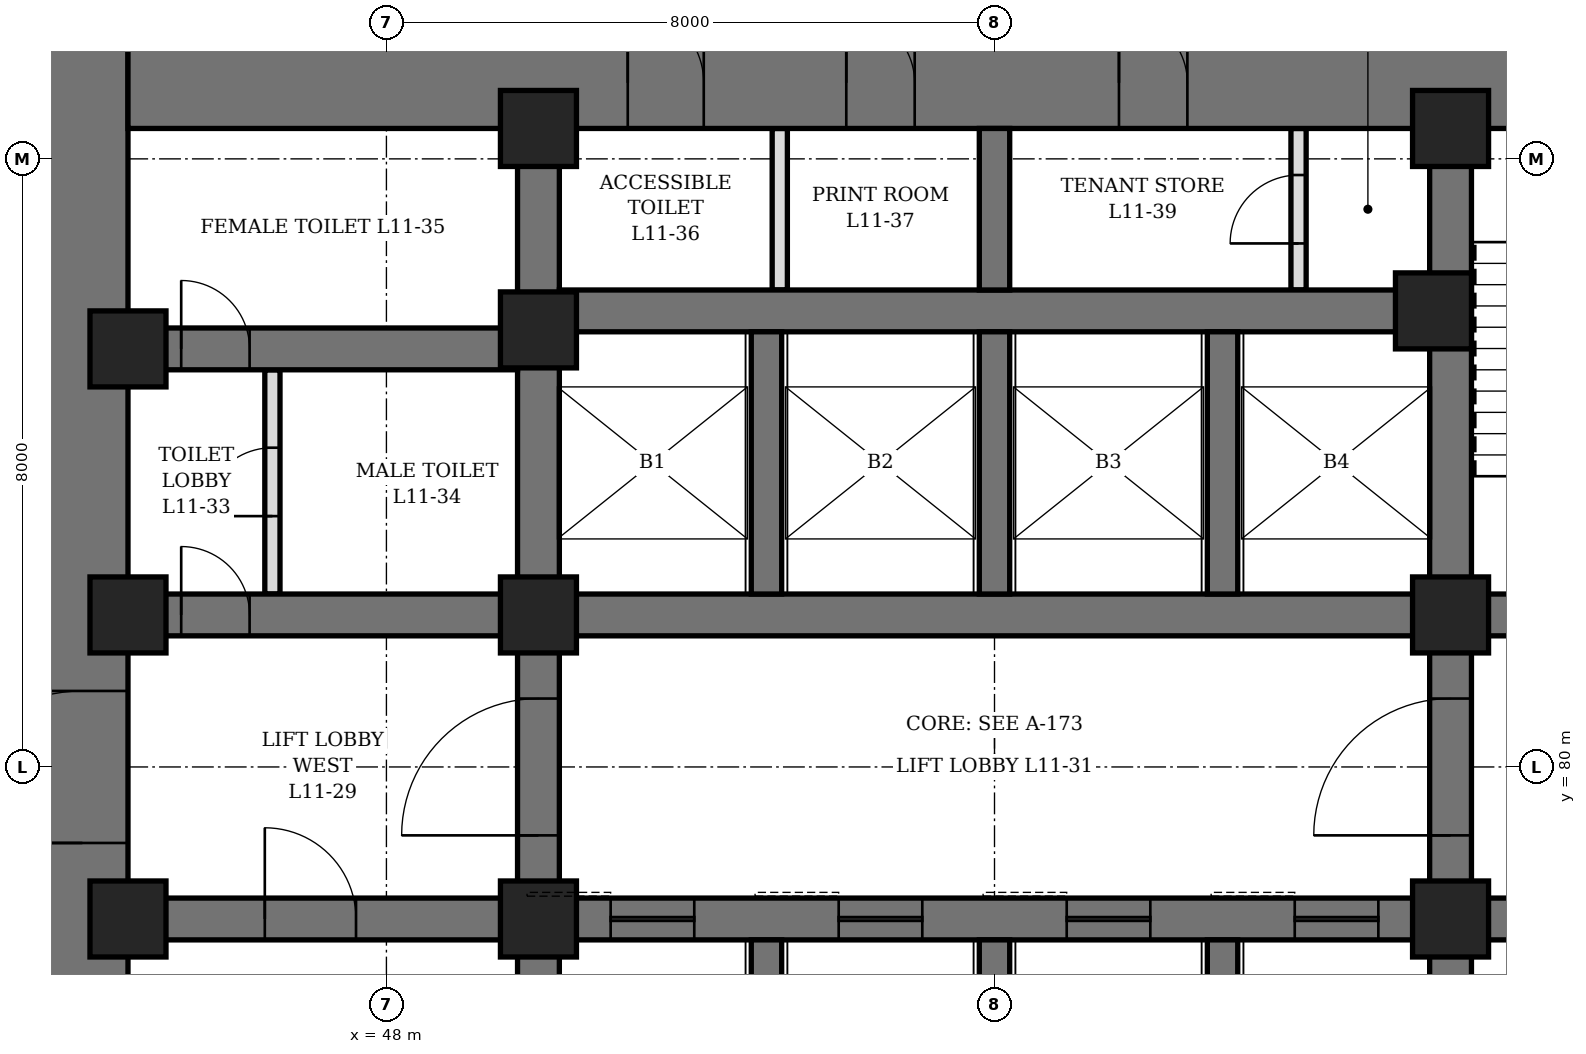
"""IFC4 building model, lengths in metres.
Left out: names, types, materials, properties, quantities, classifications, styles, units other than length and angle.
Written with IfcOpenShell. Run it as: python <this file> out.ifc"""

import sys

from ifc_helpers import new_model, si_unit, direction, frame, frame_2d, origin, origin_2d, place, context, subcontext, project, spatial, rectangle, hollow_rectangle, extrude, element, fill, save


model = new_model("IFC4")
c1 = context("Model", 3, precision=1e-05, world=origin(), true_north=direction((0.0, 1.0)))
c2 = subcontext(c1, "Body", "Model", "MODEL_VIEW")
j1 = project(units=[si_unit("LENGTHUNIT", "METRE"), si_unit("PLANEANGLEUNIT", "RADIAN")], contexts=[c1])
p1 = place(None, origin())
s1 = spatial("IfcSite", under=j1, at=p1, CompositionType="ELEMENT")
p2 = place(p1, origin())
s2 = spatial("IfcBuilding", under=s1, at=p2, CompositionType="ELEMENT")
p3 = place(p2, frame((0.0, 0.0, 55.9)))
s3 = spatial("IfcBuildingStorey", under=s2, at=p3, CompositionType="ELEMENT", Elevation=55.9)
p4 = place(p3, frame((44.0, 70.4, 0.0), z_axis=(0.0, 0.0, 1.0), x_axis=(0.0, 1.0, 0.0)))
e1 = element("IfcWall", 1, at=p4, inside=s3, PredefinedType="SHEAR", context=c2, shape_type="SweptSolid", body=[
    extrude(rectangle(XDim=19.2, YDim=1.2, at=frame_2d((9.6, 0.0))), origin(), (0.0, 0.0, 1.0), 4.2),
])
p5 = place(p4, frame((8.6, 0.0, 0.0)))
e2 = element("IfcOpeningElement", 2, at=p5, cuts=e1, PredefinedType="OPENING", context=c2, shape_type="SweptSolid", body=[
    extrude(rectangle(XDim=2.0, YDim=2.4, at=frame_2d((1.0, 1.2))), frame((0.0, 0.61, 0.0), z_axis=(0.0, -1.0, 0.0), x_axis=(1.0, 0.0, 0.0)), (0.0, 0.0, 1.0), 1.22),
])
p6 = place(p3, frame((44.6, 89.0, 0.0), z_axis=(0.0, 0.0, 1.0), x_axis=(1.0, 0.0, 0.0)))
e3 = element("IfcWall", 3, at=p6, inside=s3, PredefinedType="SHEAR", context=c2, shape_type="SweptSolid", body=[
    extrude(rectangle(XDim=22.8, YDim=1.2, at=frame_2d((11.4, 0.0))), origin(), (0.0, 0.0, 1.0), 4.2),
])
p7 = place(p6, frame((6.575, 0.0, 0.0)))
e4 = element("IfcOpeningElement", 4, at=p7, cuts=e3, PredefinedType="OPENING", context=c2, shape_type="SweptSolid", body=[
    extrude(rectangle(XDim=1.0, YDim=2.1, at=frame_2d((0.5, 1.05))), frame((0.0, 0.61, 0.0), z_axis=(0.0, -1.0, 0.0), x_axis=(1.0, 0.0, 0.0)), (0.0, 0.0, 1.0), 1.22),
])
p8 = place(p6, frame((9.45, 0.0, 0.0)))
e5 = element("IfcOpeningElement", 5, at=p8, cuts=e3, PredefinedType="OPENING", context=c2, shape_type="SweptSolid", body=[
    extrude(rectangle(XDim=0.9, YDim=2.1, at=frame_2d((0.45, 1.05))), frame((0.0, 0.61, 0.0), z_axis=(0.0, -1.0, 0.0), x_axis=(1.0, 0.0, 0.0)), (0.0, 0.0, 1.0), 1.22),
])
p9 = place(p6, frame((13.038, 0.0, 0.0)))
e6 = element("IfcOpeningElement", 6, at=p9, cuts=e3, PredefinedType="OPENING", context=c2, shape_type="SweptSolid", body=[
    extrude(rectangle(XDim=0.9, YDim=2.1, at=frame_2d((0.45, 1.05))), frame((0.0, 0.61, 0.0), z_axis=(0.0, -1.0, 0.0), x_axis=(1.0, 0.0, 0.0)), (0.0, 0.0, 1.0), 1.22),
])
p10 = place(p3, frame((50.0, 71.6, 0.0), z_axis=(0.0, 0.0, 1.0), x_axis=(0.0, 1.0, 0.0)))
e7 = element("IfcWall", 7, at=p10, inside=s3, PredefinedType="SHEAR", context=c2, shape_type="SweptSolid", body=[
    extrude(rectangle(XDim=16.8, YDim=0.55, at=frame_2d((8.4, 0.0))), origin(), (0.0, 0.0, 1.0), 4.2),
])
p11 = place(p10, frame((7.5, 0.0, 0.0)))
e8 = element("IfcOpeningElement", 8, at=p11, cuts=e7, PredefinedType="OPENING", context=c2, shape_type="SweptSolid", body=[
    extrude(rectangle(XDim=1.8, YDim=2.4, at=frame_2d((0.9, 1.2))), frame((0.0, 0.285, 0.0), z_axis=(0.0, -1.0, 0.0), x_axis=(1.0, 0.0, 0.0)), (0.0, 0.0, 1.0), 0.57),
])
p12 = place(p3, frame((62.0, 71.6, 0.0), z_axis=(0.0, 0.0, 1.0), x_axis=(0.0, 1.0, 0.0)))
e9 = element("IfcWall", 9, at=p12, inside=s3, PredefinedType="SHEAR", context=c2, shape_type="SweptSolid", body=[
    extrude(rectangle(XDim=16.8, YDim=0.55, at=frame_2d((8.4, 0.0))), origin(), (0.0, 0.0, 1.0), 4.2),
])
p13 = place(p12, frame((7.5, 0.0, 0.0)))
e10 = element("IfcOpeningElement", 10, at=p13, cuts=e9, PredefinedType="OPENING", context=c2, shape_type="SweptSolid", body=[
    extrude(rectangle(XDim=1.8, YDim=2.4, at=frame_2d((0.9, 1.2))), frame((0.0, 0.285, 0.0), z_axis=(0.0, -1.0, 0.0), x_axis=(1.0, 0.0, 0.0)), (0.0, 0.0, 1.0), 0.57),
])
p14 = place(p3, frame((44.6, 78.0, 0.0), z_axis=(0.0, 0.0, 1.0), x_axis=(1.0, 0.0, 0.0)))
e11 = element("IfcWall", 11, at=p14, inside=s3, PredefinedType="SHEAR", context=c2, shape_type="SweptSolid", body=[
    extrude(rectangle(XDim=5.125, YDim=0.55, at=frame_2d((2.562, 0.0))), origin(), (0.0, 0.0, 1.0), 4.2),
])
p15 = place(p14, frame((1.8, 0.0, 0.0)))
e12 = element("IfcOpeningElement", 12, at=p15, cuts=e11, PredefinedType="OPENING", context=c2, shape_type="SweptSolid", body=[
    extrude(rectangle(XDim=1.2, YDim=2.1, at=frame_2d((0.6, 1.05))), frame((0.0, 0.285, 0.0), z_axis=(0.0, -1.0, 0.0), x_axis=(1.0, 0.0, 0.0)), (0.0, 0.0, 1.0), 0.57),
])
p16 = place(p3, frame((44.6, 82.0, 0.0), z_axis=(0.0, 0.0, 1.0), x_axis=(1.0, 0.0, 0.0)))
e13 = element("IfcWall", 13, at=p16, inside=s3, PredefinedType="SHEAR", context=c2, shape_type="SweptSolid", body=[
    extrude(rectangle(XDim=5.125, YDim=0.55, at=frame_2d((2.562, 0.0))), origin(), (0.0, 0.0, 1.0), 4.2),
])
p17 = place(p16, frame((0.7, 0.0, 0.0)))
e14 = element("IfcOpeningElement", 14, at=p17, cuts=e13, PredefinedType="OPENING", context=c2, shape_type="SweptSolid", body=[
    extrude(rectangle(XDim=0.9, YDim=2.1, at=frame_2d((0.45, 1.05))), frame((0.0, 0.285, 0.0), z_axis=(0.0, -1.0, 0.0), x_axis=(1.0, 0.0, 0.0)), (0.0, 0.0, 1.0), 0.57),
])
p18 = place(p3, frame((44.6, 85.5, 0.0), z_axis=(0.0, 0.0, 1.0), x_axis=(1.0, 0.0, 0.0)))
e15 = element("IfcWall", 15, at=p18, inside=s3, PredefinedType="SHEAR", context=c2, shape_type="SweptSolid", body=[
    extrude(rectangle(XDim=5.125, YDim=0.55, at=frame_2d((2.562, 0.0))), origin(), (0.0, 0.0, 1.0), 4.2),
])
p19 = place(p18, frame((0.7, 0.0, 0.0)))
e16 = element("IfcOpeningElement", 16, at=p19, cuts=e15, PredefinedType="OPENING", context=c2, shape_type="SweptSolid", body=[
    extrude(rectangle(XDim=0.9, YDim=2.1, at=frame_2d((0.45, 1.05))), frame((0.0, 0.285, 0.0), z_axis=(0.0, -1.0, 0.0), x_axis=(1.0, 0.0, 0.0)), (0.0, 0.0, 1.0), 0.57),
])
p20 = place(p3, frame((62.275, 78.0, 0.0), z_axis=(0.0, 0.0, 1.0), x_axis=(1.0, 0.0, 0.0)))
e17 = element("IfcWall", 17, at=p20, inside=s3, PredefinedType="SHEAR", context=c2, shape_type="SweptSolid", body=[
    extrude(rectangle(XDim=5.125, YDim=0.55, at=frame_2d((2.562, 0.0))), origin(), (0.0, 0.0, 1.0), 4.2),
])
p21 = place(p20, frame((2.125, 0.0, 0.0)))
e18 = element("IfcOpeningElement", 18, at=p21, cuts=e17, PredefinedType="OPENING", context=c2, shape_type="SweptSolid", body=[
    extrude(rectangle(XDim=1.2, YDim=2.1, at=frame_2d((0.6, 1.05))), frame((0.0, 0.285, 0.0), z_axis=(0.0, -1.0, 0.0), x_axis=(1.0, 0.0, 0.0)), (0.0, 0.0, 1.0), 0.57),
])
p22 = place(p3, frame((62.275, 82.0, 0.0), z_axis=(0.0, 0.0, 1.0), x_axis=(1.0, 0.0, 0.0)))
e19 = element("IfcWall", 19, at=p22, inside=s3, PredefinedType="SHEAR", context=c2, shape_type="SweptSolid", body=[
    extrude(rectangle(XDim=5.125, YDim=0.55, at=frame_2d((2.562, 0.0))), origin(), (0.0, 0.0, 1.0), 4.2),
])
p23 = place(p22, frame((2.125, 0.0, 0.0)))
e20 = element("IfcOpeningElement", 20, at=p23, cuts=e19, PredefinedType="OPENING", context=c2, shape_type="SweptSolid", body=[
    extrude(rectangle(XDim=1.2, YDim=2.1, at=frame_2d((0.6, 1.05))), frame((0.0, 0.285, 0.0), z_axis=(0.0, -1.0, 0.0), x_axis=(1.0, 0.0, 0.0)), (0.0, 0.0, 1.0), 0.57),
])
p24 = place(p3, frame((50.275, 78.0, 0.0), z_axis=(0.0, 0.0, 1.0), x_axis=(1.0, 0.0, 0.0)))
e21 = element("IfcWall", 21, at=p24, inside=s3, PredefinedType="SHEAR", context=c2, shape_type="SweptSolid", body=[
    extrude(rectangle(XDim=11.45, YDim=0.55, at=frame_2d((5.725, 0.0))), origin(), (0.0, 0.0, 1.0), 4.2),
])
p25 = place(p24, frame((0.675, 0.0, 0.0)))
e22 = element("IfcOpeningElement", 22, at=p25, cuts=e21, PredefinedType="OPENING", context=c2, shape_type="SweptSolid", body=[
    extrude(rectangle(XDim=1.1, YDim=2.2, at=frame_2d((0.55, 1.1))), frame((0.0, 0.285, 0.0), z_axis=(0.0, -1.0, 0.0), x_axis=(1.0, 0.0, 0.0)), (0.0, 0.0, 1.0), 0.57),
])
p26 = place(p24, frame((3.675, 0.0, 0.0)))
e23 = element("IfcOpeningElement", 23, at=p26, cuts=e21, PredefinedType="OPENING", context=c2, shape_type="SweptSolid", body=[
    extrude(rectangle(XDim=1.1, YDim=2.2, at=frame_2d((0.55, 1.1))), frame((0.0, 0.285, 0.0), z_axis=(0.0, -1.0, 0.0), x_axis=(1.0, 0.0, 0.0)), (0.0, 0.0, 1.0), 0.57),
])
p27 = place(p24, frame((6.675, 0.0, 0.0)))
e24 = element("IfcOpeningElement", 24, at=p27, cuts=e21, PredefinedType="OPENING", context=c2, shape_type="SweptSolid", body=[
    extrude(rectangle(XDim=1.1, YDim=2.2, at=frame_2d((0.55, 1.1))), frame((0.0, 0.285, 0.0), z_axis=(0.0, -1.0, 0.0), x_axis=(1.0, 0.0, 0.0)), (0.0, 0.0, 1.0), 0.57),
])
p28 = place(p24, frame((9.675, 0.0, 0.0)))
e25 = element("IfcOpeningElement", 25, at=p28, cuts=e21, PredefinedType="OPENING", context=c2, shape_type="SweptSolid", body=[
    extrude(rectangle(XDim=1.1, YDim=2.2, at=frame_2d((0.55, 1.1))), frame((0.0, 0.285, 0.0), z_axis=(0.0, -1.0, 0.0), x_axis=(1.0, 0.0, 0.0)), (0.0, 0.0, 1.0), 0.57),
])
for number, where, z_axis, x_axis in (
    (26, (50.275, 82.0, 0.0), (0.0, 0.0, 1.0), (1.0, 0.0, 0.0)),
    (27, (50.275, 86.0, 0.0), (0.0, 0.0, 1.0), (1.0, 0.0, 0.0)),
):
    element("IfcWall", number, at=place(p3, frame(where, z_axis=z_axis, x_axis=x_axis)), inside=s3, PredefinedType="SHEAR", context=c2, shape_type="SweptSolid", body=[
        extrude(rectangle(XDim=11.45, YDim=0.55, at=frame_2d((5.725, 0.0))), origin(), (0.0, 0.0, 1.0), 4.2),
    ])
p29 = place(p3, frame((53.0, 74.2, 0.0), z_axis=(0.0, 0.0, 1.0), x_axis=(0.0, 1.0, 0.0)))
e28 = element("IfcWall", 28, at=p29, inside=s3, PredefinedType="SHEAR", context=c2, shape_type="SweptSolid", body=[
    extrude(rectangle(XDim=3.525, YDim=0.4, at=frame_2d((1.763, 0.0))), origin(), (0.0, 0.0, 1.0), 4.2),
])
p30 = place(p3, frame((53.0, 82.275, 0.0), z_axis=(0.0, 0.0, 1.0), x_axis=(0.0, 1.0, 0.0)))
e29 = element("IfcWall", 29, at=p30, inside=s3, PredefinedType="SHEAR", context=c2, shape_type="SweptSolid", body=[
    extrude(rectangle(XDim=3.45, YDim=0.4, at=frame_2d((1.725, 0.0))), origin(), (0.0, 0.0, 1.0), 4.2),
])
p31 = place(p3, frame((56.0, 74.2, 0.0), z_axis=(0.0, 0.0, 1.0), x_axis=(0.0, 1.0, 0.0)))
e30 = element("IfcWall", 30, at=p31, inside=s3, PredefinedType="SHEAR", context=c2, shape_type="SweptSolid", body=[
    extrude(rectangle(XDim=3.525, YDim=0.4, at=frame_2d((1.763, 0.0))), origin(), (0.0, 0.0, 1.0), 4.2),
])
p32 = place(p3, frame((56.0, 82.275, 0.0), z_axis=(0.0, 0.0, 1.0), x_axis=(0.0, 1.0, 0.0)))
e31 = element("IfcWall", 31, at=p32, inside=s3, PredefinedType="SHEAR", context=c2, shape_type="SweptSolid", body=[
    extrude(rectangle(XDim=3.45, YDim=0.4, at=frame_2d((1.725, 0.0))), origin(), (0.0, 0.0, 1.0), 4.2),
])
p33 = place(p3, frame((59.0, 74.2, 0.0), z_axis=(0.0, 0.0, 1.0), x_axis=(0.0, 1.0, 0.0)))
e32 = element("IfcWall", 32, at=p33, inside=s3, PredefinedType="SHEAR", context=c2, shape_type="SweptSolid", body=[
    extrude(rectangle(XDim=3.525, YDim=0.4, at=frame_2d((1.763, 0.0))), origin(), (0.0, 0.0, 1.0), 4.2),
])
p34 = place(p3, frame((59.0, 82.275, 0.0), z_axis=(0.0, 0.0, 1.0), x_axis=(0.0, 1.0, 0.0)))
e33 = element("IfcWall", 33, at=p34, inside=s3, PredefinedType="SHEAR", context=c2, shape_type="SweptSolid", body=[
    extrude(rectangle(XDim=3.45, YDim=0.4, at=frame_2d((1.725, 0.0))), origin(), (0.0, 0.0, 1.0), 4.2),
])
p35 = place(p3, frame((56.0, 86.275, 0.0), z_axis=(0.0, 0.0, 1.0), x_axis=(0.0, 1.0, 0.0)))
e34 = element("IfcWall", 34, at=p35, inside=s3, PredefinedType="SHEAR", context=c2, shape_type="SweptSolid", body=[
    extrude(rectangle(XDim=2.125, YDim=0.4, at=frame_2d((1.062, 0.0))), origin(), (0.0, 0.0, 1.0), 4.2),
])
for number, where, z_axis, x_axis in (
    (35, (44.6, 78.0, 0.0), (0.0, 0.0, 1.0), (1.0, 0.0, 0.0)),
    (36, (44.6, 82.0, 0.0), (0.0, 0.0, 1.0), (1.0, 0.0, 0.0)),
    (37, (44.6, 85.5, 0.0), (0.0, 0.0, 1.0), (1.0, 0.0, 0.0)),
    (38, (50.0, 78.0, 0.0), (0.0, 0.0, 1.0), (1.0, 0.0, 0.0)),
    (39, (50.0, 82.0, 0.0), (0.0, 0.0, 1.0), (1.0, 0.0, 0.0)),
    (40, (50.0, 85.75, 0.0), (0.0, 0.0, 1.0), (1.0, 0.0, 0.0)),
    (41, (50.0, 88.4, 0.0), (0.0, 0.0, 1.0), (1.0, 0.0, 0.0)),
    (42, (61.775, 86.0, 0.0), (0.0, 0.0, 1.0), (1.0, 0.0, 0.0)),
    (43, (62.0, 78.0, 0.0), (0.0, 0.0, 1.0), (1.0, 0.0, 0.0)),
    (44, (62.0, 82.0, 0.0), (0.0, 0.0, 1.0), (1.0, 0.0, 0.0)),
    (45, (62.0, 88.4, 0.0), (0.0, 0.0, 1.0), (1.0, 0.0, 0.0)),
):
    element("IfcColumn", number, at=place(p3, frame(where, z_axis=z_axis, x_axis=x_axis)), inside=s3, PredefinedType="COLUMN", context=c2, shape_type="SweptSolid", body=[
        extrude(hollow_rectangle(XDim=1.0, YDim=1.0, WallThickness=0.15, at=origin_2d()), origin(), (0.0, 0.0, 1.0), 4.2),
    ])
p36 = place(p3, frame((46.5, 82.275, 0.0), z_axis=(0.0, 0.0, 1.0), x_axis=(0.0, 1.0, 0.0)))
e46 = element("IfcWall", 46, at=p36, inside=s3, PredefinedType="PARTITIONING", context=c2, shape_type="SweptSolid", body=[
    extrude(rectangle(XDim=2.95, YDim=0.2, at=frame_2d((1.475, 0.0))), origin(), (0.0, 0.0, 1.0), 4.04),
])
p37 = place(p36, frame((1.025, 0.0, 0.0)))
e47 = element("IfcOpeningElement", 47, at=p37, cuts=e46, PredefinedType="OPENING", context=c2, shape_type="SweptSolid", body=[
    extrude(rectangle(XDim=0.9, YDim=2.1, at=frame_2d((0.45, 1.05))), frame((0.0, 0.11, 0.0), z_axis=(0.0, -1.0, 0.0), x_axis=(1.0, 0.0, 0.0)), (0.0, 0.0, 1.0), 0.22),
])
p38 = place(p3, frame((53.175, 86.275, 0.0), z_axis=(0.0, 0.0, 1.0), x_axis=(0.0, 1.0, 0.0)))
e48 = element("IfcWall", 48, at=p38, inside=s3, PredefinedType="PARTITIONING", context=c2, shape_type="SweptSolid", body=[
    extrude(rectangle(XDim=2.125, YDim=0.2, at=frame_2d((1.062, 0.0))), origin(), (0.0, 0.0, 1.0), 4.04),
])
p39 = place(p3, frame((60.0, 86.275, 0.0), z_axis=(0.0, 0.0, 1.0), x_axis=(0.0, 1.0, 0.0)))
e49 = element("IfcWall", 49, at=p39, inside=s3, PredefinedType="PARTITIONING", context=c2, shape_type="SweptSolid", body=[
    extrude(rectangle(XDim=2.125, YDim=0.2, at=frame_2d((1.062, 0.0))), origin(), (0.0, 0.0, 1.0), 4.04),
])
p40 = place(p39, frame((0.613, 0.0, 0.0)))
e50 = element("IfcOpeningElement", 50, at=p40, cuts=e49, PredefinedType="OPENING", context=c2, shape_type="SweptSolid", body=[
    extrude(rectangle(XDim=0.9, YDim=2.1, at=frame_2d((0.45, 1.05))), frame((0.0, 0.11, 0.0), z_axis=(0.0, -1.0, 0.0), x_axis=(1.0, 0.0, 0.0)), (0.0, 0.0, 1.0), 0.22),
])
p41 = place(p17, origin())
e51 = element("IfcDoor", 51, at=p41, inside=s3, OperationType="SINGLE_SWING_LEFT", PredefinedType="DOOR", context=c2, shape_type="SweptSolid", body=[
    extrude(rectangle(XDim=0.9, YDim=2.1, at=frame_2d((0.45, 1.05))), frame((0.0, 0.275, 0.0), z_axis=(0.0, -1.0, 0.0), x_axis=(1.0, 0.0, 0.0)), (0.0, 0.0, 1.0), 0.55),
])
fill(e14, e51)
p42 = place(p37, origin())
e52 = element("IfcDoor", 52, at=p42, inside=s3, OperationType="SINGLE_SWING_RIGHT", PredefinedType="DOOR", context=c2, shape_type="SweptSolid", body=[
    extrude(rectangle(XDim=0.9, YDim=2.1, at=frame_2d((0.45, 1.05))), frame((0.0, 0.1, 0.0), z_axis=(0.0, -1.0, 0.0), x_axis=(1.0, 0.0, 0.0)), (0.0, 0.0, 1.0), 0.199),
])
fill(e47, e52)
p43 = place(p19, origin())
e53 = element("IfcDoor", 53, at=p43, inside=s3, OperationType="SINGLE_SWING_RIGHT", PredefinedType="DOOR", context=c2, shape_type="SweptSolid", body=[
    extrude(rectangle(XDim=0.9, YDim=2.1, at=frame_2d((0.45, 1.05))), frame((0.0, 0.275, 0.0), z_axis=(0.0, -1.0, 0.0), x_axis=(1.0, 0.0, 0.0)), (0.0, 0.0, 1.0), 0.55),
])
fill(e16, e53)
p44 = place(p7, origin())
e54 = element("IfcDoor", 54, at=p44, inside=s3, OperationType="SINGLE_SWING_LEFT", PredefinedType="DOOR", context=c2, shape_type="SweptSolid", body=[
    extrude(rectangle(XDim=1.0, YDim=2.1, at=frame_2d((0.5, 1.05))), frame((0.0, 0.35, 0.0), z_axis=(0.0, -1.0, 0.0), x_axis=(1.0, 0.0, 0.0)), (0.0, 0.0, 1.0), 0.7),
])
fill(e4, e54)
p45 = place(p8, origin())
e55 = element("IfcDoor", 55, at=p45, inside=s3, OperationType="SINGLE_SWING_LEFT", PredefinedType="DOOR", context=c2, shape_type="SweptSolid", body=[
    extrude(rectangle(XDim=0.9, YDim=2.1, at=frame_2d((0.45, 1.05))), frame((0.0, 0.35, 0.0), z_axis=(0.0, -1.0, 0.0), x_axis=(1.0, 0.0, 0.0)), (0.0, 0.0, 1.0), 0.7),
])
fill(e5, e55)
p46 = place(p9, origin())
e56 = element("IfcDoor", 56, at=p46, inside=s3, OperationType="SINGLE_SWING_LEFT", PredefinedType="DOOR", context=c2, shape_type="SweptSolid", body=[
    extrude(rectangle(XDim=0.9, YDim=2.1, at=frame_2d((0.45, 1.05))), frame((0.0, 0.35, 0.0), z_axis=(0.0, -1.0, 0.0), x_axis=(1.0, 0.0, 0.0)), (0.0, 0.0, 1.0), 0.7),
])
fill(e6, e56)
p47 = place(p40, origin())
e57 = element("IfcDoor", 57, at=p47, inside=s3, OperationType="SINGLE_SWING_LEFT", PredefinedType="DOOR", context=c2, shape_type="SweptSolid", body=[
    extrude(rectangle(XDim=0.9, YDim=2.1, at=frame_2d((0.45, 1.05))), frame((0.0, 0.1, 0.0), z_axis=(0.0, -1.0, 0.0), x_axis=(1.0, 0.0, 0.0)), (0.0, 0.0, 1.0), 0.199),
])
fill(e50, e57)
p48 = place(p15, origin())
e58 = element("IfcDoor", 58, at=p48, inside=s3, OperationType="SINGLE_SWING_LEFT", PredefinedType="DOOR", context=c2, shape_type="SweptSolid", body=[
    extrude(rectangle(XDim=1.2, YDim=2.1, at=frame_2d((0.6, 1.05))), frame((0.0, 0.275, 0.0), z_axis=(0.0, -1.0, 0.0), x_axis=(1.0, 0.0, 0.0)), (0.0, 0.0, 1.0), 0.55),
])
fill(e12, e58)
p49 = place(p5, origin())
e59 = element("IfcDoor", 59, at=p49, inside=s3, OperationType="DOUBLE_DOOR_SINGLE_SWING", PredefinedType="DOOR", context=c2, shape_type="SweptSolid", body=[
    extrude(rectangle(XDim=2.0, YDim=2.4, at=frame_2d((1.0, 1.2))), frame((0.0, 0.35, 0.0), z_axis=(0.0, -1.0, 0.0), x_axis=(1.0, 0.0, 0.0)), (0.0, 0.0, 1.0), 0.7),
])
fill(e2, e59)
p50 = place(p11, origin())
e60 = element("IfcDoor", 60, at=p50, inside=s3, OperationType="DOUBLE_DOOR_SINGLE_SWING", PredefinedType="DOOR", context=c2, shape_type="SweptSolid", body=[
    extrude(rectangle(XDim=1.8, YDim=2.4, at=frame_2d((0.9, 1.2))), frame((0.0, 0.275, 0.0), z_axis=(0.0, -1.0, 0.0), x_axis=(1.0, 0.0, 0.0)), (0.0, 0.0, 1.0), 0.55),
])
fill(e8, e60)
p51 = place(p13, origin())
e61 = element("IfcDoor", 61, at=p51, inside=s3, OperationType="DOUBLE_DOOR_SINGLE_SWING", PredefinedType="DOOR", context=c2, shape_type="SweptSolid", body=[
    extrude(rectangle(XDim=1.8, YDim=2.4, at=frame_2d((0.9, 1.2))), frame((0.0, 0.275, 0.0), z_axis=(0.0, -1.0, 0.0), x_axis=(1.0, 0.0, 0.0)), (0.0, 0.0, 1.0), 0.55),
])
fill(e10, e61)
p52 = place(p25, origin())
e62 = element("IfcDoor", 62, at=p52, inside=s3, OperationType="SLIDING_TO_LEFT", PredefinedType="DOOR", context=c2, shape_type="SweptSolid", body=[
    extrude(rectangle(XDim=1.1, YDim=2.2, at=frame_2d((0.55, 1.1))), frame((0.0, 0.275, 0.0), z_axis=(0.0, -1.0, 0.0), x_axis=(1.0, 0.0, 0.0)), (0.0, 0.0, 1.0), 0.55),
])
fill(e22, e62)
p53 = place(p26, origin())
e63 = element("IfcDoor", 63, at=p53, inside=s3, OperationType="SLIDING_TO_LEFT", PredefinedType="DOOR", context=c2, shape_type="SweptSolid", body=[
    extrude(rectangle(XDim=1.1, YDim=2.2, at=frame_2d((0.55, 1.1))), frame((0.0, 0.275, 0.0), z_axis=(0.0, -1.0, 0.0), x_axis=(1.0, 0.0, 0.0)), (0.0, 0.0, 1.0), 0.55),
])
fill(e23, e63)
p54 = place(p27, origin())
e64 = element("IfcDoor", 64, at=p54, inside=s3, OperationType="SLIDING_TO_LEFT", PredefinedType="DOOR", context=c2, shape_type="SweptSolid", body=[
    extrude(rectangle(XDim=1.1, YDim=2.2, at=frame_2d((0.55, 1.1))), frame((0.0, 0.275, 0.0), z_axis=(0.0, -1.0, 0.0), x_axis=(1.0, 0.0, 0.0)), (0.0, 0.0, 1.0), 0.55),
])
fill(e24, e64)
p55 = place(p28, origin())
e65 = element("IfcDoor", 65, at=p55, inside=s3, OperationType="SLIDING_TO_LEFT", PredefinedType="DOOR", context=c2, shape_type="SweptSolid", body=[
    extrude(rectangle(XDim=1.1, YDim=2.2, at=frame_2d((0.55, 1.1))), frame((0.0, 0.275, 0.0), z_axis=(0.0, -1.0, 0.0), x_axis=(1.0, 0.0, 0.0)), (0.0, 0.0, 1.0), 0.55),
])
fill(e25, e65)
save(model, sys.argv[1])
